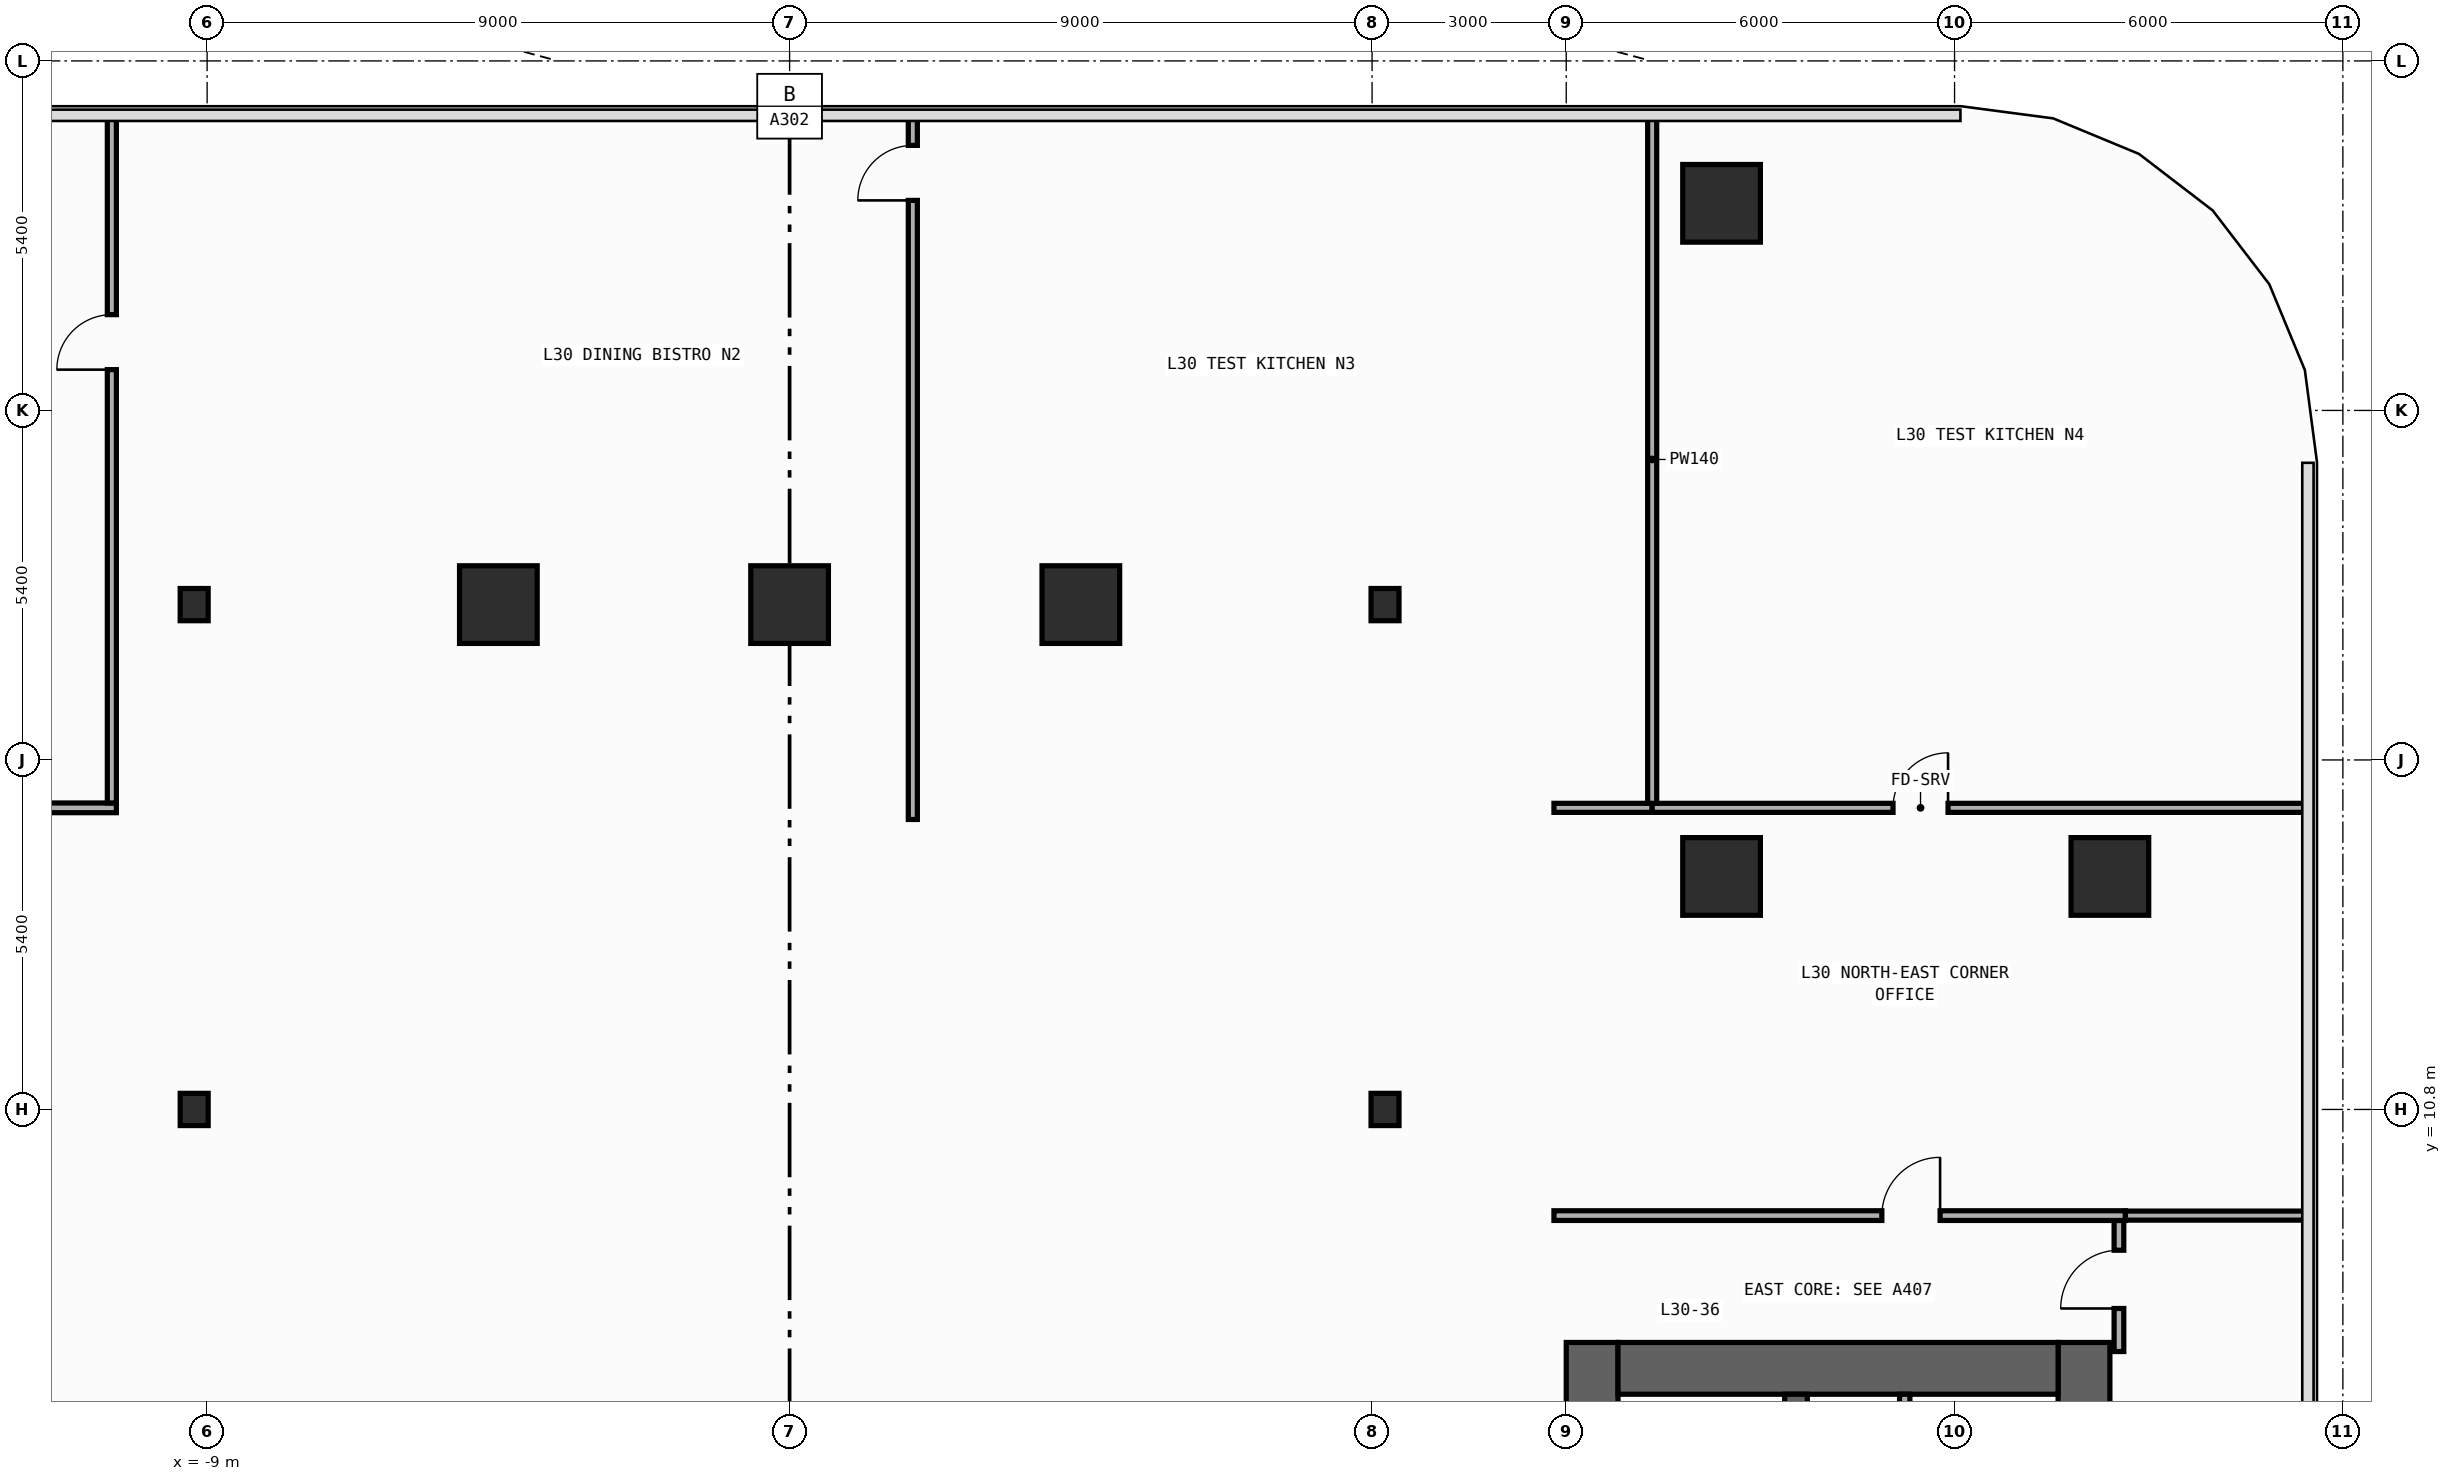
"""IFC4 building model, lengths in metres.
Left out: names, types, materials, properties, quantities, classifications, styles, units other than length and angle.
Written with IfcOpenShell. Run it as: python <this file> out.ifc"""

import sys

from ifc_helpers import new_model, si_unit, direction, frame, frame_2d, origin, origin_2d, place, context, subcontext, project, spatial, rectangle, i_section, extrude, element, fill, save


model = new_model("IFC4")
c1 = context("Model", 3, precision=1e-05, world=origin(), true_north=direction((0.0, 1.0)))
c2 = subcontext(c1, "Body", "Model", "MODEL_VIEW")
j1 = project(units=[si_unit("LENGTHUNIT", "METRE"), si_unit("PLANEANGLEUNIT", "RADIAN")], contexts=[c1])
p1 = place(None, origin())
s1 = spatial("IfcSite", under=j1, at=p1, CompositionType="ELEMENT")
p2 = place(p1, origin())
s2 = spatial("IfcBuilding", under=s1, at=p2, CompositionType="ELEMENT")
p3 = place(p2, frame((0.0, 0.0, 131.0)))
s3 = spatial("IfcBuildingStorey", under=s2, at=p3, CompositionType="ELEMENT", Elevation=131.0)
p4 = place(p3, frame((12.4, -19.8, 0.0), z_axis=(0.0, 0.0, 1.0), x_axis=(0.0, 1.0, 0.0)))
e1 = element("IfcWall", 1, at=p4, inside=s3, PredefinedType="SHEAR", context=c2, shape_type="SweptSolid", body=[
    extrude(rectangle(XDim=27.0, YDim=0.8, at=frame_2d((13.5, 0.0))), origin(), (0.0, 0.0, 1.0), 3.94),
])
p5 = place(p4, frame((23.05, 0.0, 0.0)))
e2 = element("IfcOpeningElement", 2, at=p5, cuts=e1, PredefinedType="OPENING", context=c2, shape_type="SweptSolid", body=[
    extrude(rectangle(XDim=1.1, YDim=2.2, at=frame_2d((0.55, 1.1))), frame((0.0, 0.41, 0.0), z_axis=(0.0, -1.0, 0.0), x_axis=(1.0, 0.0, 0.0)), (0.0, 0.0, 1.0), 0.82),
])
p6 = place(p4, frame((19.85, 0.0, 0.0)))
e3 = element("IfcOpeningElement", 3, at=p6, cuts=e1, PredefinedType="OPENING", context=c2, shape_type="SweptSolid", body=[
    extrude(rectangle(XDim=1.1, YDim=2.2, at=frame_2d((0.55, 1.1))), frame((0.0, 0.41, 0.0), z_axis=(0.0, -1.0, 0.0), x_axis=(1.0, 0.0, 0.0)), (0.0, 0.0, 1.0), 0.82),
])
p7 = place(p4, frame((16.65, 0.0, 0.0)))
e4 = element("IfcOpeningElement", 4, at=p7, cuts=e1, PredefinedType="OPENING", context=c2, shape_type="SweptSolid", body=[
    extrude(rectangle(XDim=1.1, YDim=2.2, at=frame_2d((0.55, 1.1))), frame((0.0, 0.41, 0.0), z_axis=(0.0, -1.0, 0.0), x_axis=(1.0, 0.0, 0.0)), (0.0, 0.0, 1.0), 0.82),
])
p8 = place(p4, frame((6.275, 0.0, 0.0)))
e5 = element("IfcOpeningElement", 5, at=p8, cuts=e1, PredefinedType="OPENING", context=c2, shape_type="SweptSolid", body=[
    extrude(rectangle(XDim=0.85, YDim=2.1, at=frame_2d((0.425, 1.05))), frame((0.0, 0.41, 0.0), z_axis=(0.0, -1.0, 0.0), x_axis=(1.0, 0.0, 0.0)), (0.0, 0.0, 1.0), 0.82),
])
p9 = place(p4, frame((8.575, 0.0, 0.0)))
e6 = element("IfcOpeningElement", 6, at=p9, cuts=e1, PredefinedType="OPENING", context=c2, shape_type="SweptSolid", body=[
    extrude(rectangle(XDim=0.85, YDim=2.1, at=frame_2d((0.425, 1.05))), frame((0.0, 0.41, 0.0), z_axis=(0.0, -1.0, 0.0), x_axis=(1.0, 0.0, 0.0)), (0.0, 0.0, 1.0), 0.82),
])
p10 = place(p4, frame((10.675, 0.0, 0.0)))
e7 = element("IfcOpeningElement", 7, at=p10, cuts=e1, PredefinedType="OPENING", context=c2, shape_type="SweptSolid", body=[
    extrude(rectangle(XDim=0.85, YDim=2.1, at=frame_2d((0.425, 1.05))), frame((0.0, 0.41, 0.0), z_axis=(0.0, -1.0, 0.0), x_axis=(1.0, 0.0, 0.0)), (0.0, 0.0, 1.0), 0.82),
])
p11 = place(p4, frame((12.725, 0.0, 0.0)))
e8 = element("IfcOpeningElement", 8, at=p11, cuts=e1, PredefinedType="OPENING", context=c2, shape_type="SweptSolid", body=[
    extrude(rectangle(XDim=1.15, YDim=2.2, at=frame_2d((0.575, 1.1))), frame((0.0, 0.41, 0.0), z_axis=(0.0, -1.0, 0.0), x_axis=(1.0, 0.0, 0.0)), (0.0, 0.0, 1.0), 0.82),
])
p12 = place(p4, frame((25.125, 0.0, 0.0)))
e9 = element("IfcOpeningElement", 9, at=p12, cuts=e1, PredefinedType="OPENING", context=c2, shape_type="SweptSolid", body=[
    extrude(rectangle(XDim=0.85, YDim=2.1, at=frame_2d((0.425, 1.05))), frame((0.0, 0.41, 0.0), z_axis=(0.0, -1.0, 0.0), x_axis=(1.0, 0.0, 0.0)), (0.0, 0.0, 1.0), 0.82),
])
p13 = place(p3, frame((20.0, -19.8, 0.0), z_axis=(0.0, 0.0, 1.0), x_axis=(0.0, 1.0, 0.0)))
e10 = element("IfcWall", 10, at=p13, inside=s3, PredefinedType="SHEAR", context=c2, shape_type="SweptSolid", body=[
    extrude(rectangle(XDim=27.0, YDim=0.8, at=frame_2d((13.5, 0.0))), origin(), (0.0, 0.0, 1.0), 3.94),
])
p14 = place(p3, frame((12.8, 6.8, 0.0), z_axis=(0.0, 0.0, 1.0), x_axis=(1.0, 0.0, 0.0)))
e11 = element("IfcWall", 11, at=p14, inside=s3, PredefinedType="SHEAR", context=c2, shape_type="SweptSolid", body=[
    extrude(rectangle(XDim=6.8, YDim=0.8, at=frame_2d((3.4, 0.0))), origin(), (0.0, 0.0, 1.0), 3.94),
])
p15 = place(p3, frame((15.55, -19.0, 0.0), z_axis=(0.0, 0.0, 1.0), x_axis=(0.0, 1.0, 0.0)))
e12 = element("IfcWall", 12, at=p15, inside=s3, PredefinedType="SHEAR", context=c2, shape_type="SweptSolid", body=[
    extrude(rectangle(XDim=25.4, YDim=0.35, at=frame_2d((12.7, 0.0))), origin(), (0.0, 0.0, 1.0), 3.94),
])
p16 = place(p15, frame((11.925, 0.0, 0.0)))
e13 = element("IfcOpeningElement", 13, at=p16, cuts=e12, PredefinedType="OPENING", context=c2, shape_type="SweptSolid", body=[
    extrude(rectangle(XDim=1.15, YDim=2.2, at=frame_2d((0.575, 1.1))), frame((0.0, 0.185, 0.0), z_axis=(0.0, -1.0, 0.0), x_axis=(1.0, 0.0, 0.0)), (0.0, 0.0, 1.0), 0.37),
])
p17 = place(p15, frame((24.325, 0.0, 0.0)))
e14 = element("IfcOpeningElement", 14, at=p17, cuts=e12, PredefinedType="OPENING", context=c2, shape_type="SweptSolid", body=[
    extrude(rectangle(XDim=0.85, YDim=2.1, at=frame_2d((0.425, 1.05))), frame((0.0, 0.185, 0.0), z_axis=(0.0, -1.0, 0.0), x_axis=(1.0, 0.0, 0.0)), (0.0, 0.0, 1.0), 0.37),
])
for number, where, z_axis, x_axis in (
    (15, (-9.2, 10.8, 0.0), (0.0, 0.0, 1.0), (1.0, 0.0, 0.0)),
    (16, (-9.2, 18.6, 0.0), (0.0, 0.0, 1.0), (1.0, 0.0, 0.0)),
    (17, (9.2, 10.8, 0.0), (0.0, 0.0, 1.0), (1.0, 0.0, 0.0)),
    (18, (9.2, 18.6, 0.0), (0.0, 0.0, 1.0), (1.0, 0.0, 0.0)),
):
    element("IfcColumn", number, at=place(p3, frame(where, z_axis=z_axis, x_axis=x_axis)), inside=s3, PredefinedType="COLUMN", context=c2, shape_type="SweptSolid", body=[
        extrude(i_section(OverallWidth=0.432, OverallDepth=0.498, WebThickness=0.045, FlangeThickness=0.07, FilletRadius=0.022, at=origin_2d()), origin(), (0.0, 0.0, 1.0), 4.2),
    ])
for number, where, z_axis, x_axis in (
    (19, (20.4, 14.4, 0.0), (0.0, 0.0, 1.0), (1.0, 0.0, 0.0)),
    (20, (14.4, 14.4, 0.0), (0.0, 0.0, 1.0), (1.0, 0.0, 0.0)),
    (21, (-4.5, 18.6, 0.0), (0.0, 0.0, 1.0), (1.0, 0.0, 0.0)),
    (22, (0.0, 18.6, 0.0), (0.0, 0.0, 1.0), (1.0, 0.0, 0.0)),
    (23, (4.5, 18.6, 0.0), (0.0, 0.0, 1.0), (1.0, 0.0, 0.0)),
    (24, (14.4, 24.8, 0.0), (0.0, 0.0, 1.0), (1.0, 0.0, 0.0)),
):
    element("IfcColumn", number, at=place(p3, frame(where, z_axis=z_axis, x_axis=x_axis)), inside=s3, PredefinedType="COLUMN", context=c2, shape_type="SweptSolid", body=[
        extrude(rectangle(XDim=1.2, YDim=1.2, at=origin_2d()), origin(), (0.0, 0.0, 1.0), 4.2),
    ])
p18 = place(p3, frame((17.23, 4.17, 0.0), z_axis=(0.0, 0.0, 1.0), x_axis=(0.0, 1.0, 0.0)))
e25 = element("IfcWall", 25, at=p18, inside=s3, PredefinedType="PARTITIONING", context=c2, shape_type="SweptSolid", body=[
    extrude(rectangle(XDim=2.23, YDim=0.16, at=frame_2d((1.115, 0.0))), origin(), (0.0, 0.0, 1.0), 3.94),
])
p19 = place(p18, frame((0.46, 0.0, 0.0)))
e26 = element("IfcOpeningElement", 26, at=p19, cuts=e25, PredefinedType="OPENING", context=c2, shape_type="SweptSolid", body=[
    extrude(rectangle(XDim=0.85, YDim=2.1, at=frame_2d((0.425, 1.05))), frame((0.0, 0.09, 0.0), z_axis=(0.0, -1.0, 0.0), x_axis=(1.0, 0.0, 0.0)), (0.0, 0.0, 1.0), 0.18),
])
p20 = place(p3, frame((-11.99, 15.46, 0.0), z_axis=(0.0, 0.0, 1.0), x_axis=(1.0, 0.0, 0.0)))
e27 = element("IfcWall", 27, at=p20, inside=s3, PredefinedType="PARTITIONING", context=c2, shape_type="SweptSolid", body=[
    extrude(rectangle(XDim=1.588, YDim=0.15, at=frame_2d((0.794, 0.0))), origin(), (0.0, 0.0, 1.0), 3.94),
])
p21 = place(p3, frame((20.54, 7.06, 0.0), z_axis=(0.0, 0.0, 1.0), x_axis=(0.0, 1.0, 0.0)))
e28 = element("IfcWall", 28, at=p21, inside=s3, PredefinedType="PARTITIONING", context=c2, shape_type="SweptSolid", body=[
    extrude(rectangle(XDim=2.025, YDim=0.15, at=frame_2d((1.012, 0.0))), origin(), (0.0, 0.0, 1.0), 3.94),
])
p22 = place(p21, frame((0.665, 0.0, 0.0)))
e29 = element("IfcOpeningElement", 29, at=p22, cuts=e28, PredefinedType="OPENING", context=c2, shape_type="SweptSolid", body=[
    extrude(rectangle(XDim=0.9, YDim=2.15, at=frame_2d((0.45, 1.075))), frame((0.0, 0.085, 0.0), z_axis=(0.0, -1.0, 0.0), x_axis=(1.0, 0.0, 0.0)), (0.0, 0.0, 1.0), 0.17),
])
p23 = place(p3, frame((11.81, 9.16, 0.0), z_axis=(0.0, 0.0, 1.0), x_axis=(1.0, 0.0, 0.0)))
e30 = element("IfcWall", 30, at=p23, inside=s3, PredefinedType="PARTITIONING", context=c2, shape_type="SweptSolid", body=[
    extrude(rectangle(XDim=8.83, YDim=0.15, at=frame_2d((4.415, 0.0))), origin(), (0.0, 0.0, 1.0), 3.94),
])
p24 = place(p23, frame((5.067, 0.0, 0.0)))
e31 = element("IfcOpeningElement", 31, at=p24, cuts=e30, PredefinedType="OPENING", context=c2, shape_type="SweptSolid", body=[
    extrude(rectangle(XDim=0.9, YDim=2.15, at=frame_2d((0.45, 1.075))), frame((0.0, 0.085, 0.0), z_axis=(0.0, -1.0, 0.0), x_axis=(1.0, 0.0, 0.0)), (0.0, 0.0, 1.0), 0.17),
])
p25 = place(p3, frame((20.64, 9.16, 0.0), z_axis=(0.0, 0.0, 1.0), x_axis=(1.0, 0.0, 0.0)))
e32 = element("IfcWall", 32, at=p25, inside=s3, PredefinedType="PARTITIONING", context=c2, shape_type="SweptSolid", body=[
    extrude(rectangle(XDim=2.815, YDim=0.14, at=frame_2d((1.408, 0.0))), origin(), (0.0, 0.0, 1.0), 3.94),
])
p26 = place(p3, frame((11.81, 15.46, 0.0), z_axis=(0.0, 0.0, 1.0), x_axis=(1.0, 0.0, 0.0)))
e33 = element("IfcWall", 33, at=p26, inside=s3, PredefinedType="PARTITIONING", context=c2, shape_type="SweptSolid", body=[
    extrude(rectangle(XDim=1.518, YDim=0.14, at=frame_2d((0.759, 0.0))), origin(), (0.0, 0.0, 1.0), 3.94),
])
p27 = place(p3, frame((13.328, 15.46, 0.0), z_axis=(0.0, 0.0, 1.0), x_axis=(1.0, 0.0, 0.0)))
e34 = element("IfcWall", 34, at=p27, inside=s3, PredefinedType="PARTITIONING", context=c2, shape_type="SweptSolid", body=[
    extrude(rectangle(XDim=10.127, YDim=0.14, at=frame_2d((5.063, 0.0))), origin(), (0.0, 0.0, 1.0), 3.94),
])
p28 = place(p27, frame((3.721, 0.0, 0.0)))
e35 = element("IfcOpeningElement", 35, at=p28, cuts=e34, PredefinedType="OPENING", context=c2, shape_type="SweptSolid", body=[
    extrude(rectangle(XDim=0.85, YDim=2.1, at=frame_2d((0.425, 1.05))), frame((0.0, 0.08, 0.0), z_axis=(0.0, -1.0, 0.0), x_axis=(1.0, 0.0, 0.0)), (0.0, 0.0, 1.0), 0.16),
])
p29 = place(p3, frame((-10.472, 15.535, 0.0), z_axis=(0.0, 0.0, 1.0), x_axis=(0.0, 1.0, 0.0)))
e36 = element("IfcWall", 36, at=p29, inside=s3, PredefinedType="PARTITIONING", context=c2, shape_type="SweptSolid", body=[
    extrude(rectangle(XDim=10.62, YDim=0.14, at=frame_2d((5.31, 0.0))), origin(), (0.0, 0.0, 1.0), 3.94),
])
p30 = place(p29, frame((6.695, 0.0, 0.0)))
e37 = element("IfcOpeningElement", 37, at=p30, cuts=e36, PredefinedType="OPENING", context=c2, shape_type="SweptSolid", body=[
    extrude(rectangle(XDim=0.85, YDim=2.1, at=frame_2d((0.425, 1.05))), frame((0.0, 0.08, 0.0), z_axis=(0.0, -1.0, 0.0), x_axis=(1.0, 0.0, 0.0)), (0.0, 0.0, 1.0), 0.16),
])
p31 = place(p3, frame((1.904, 15.28, 0.0), z_axis=(0.0, 0.0, 1.0), x_axis=(0.0, 1.0, 0.0)))
e38 = element("IfcWall", 38, at=p31, inside=s3, PredefinedType="PARTITIONING", context=c2, shape_type="SweptSolid", body=[
    extrude(rectangle(XDim=10.875, YDim=0.14, at=frame_2d((5.438, 0.0))), origin(), (0.0, 0.0, 1.0), 3.94),
])
p32 = place(p31, frame((9.565, 0.0, 0.0)))
e39 = element("IfcOpeningElement", 39, at=p32, cuts=e38, PredefinedType="OPENING", context=c2, shape_type="SweptSolid", body=[
    extrude(rectangle(XDim=0.85, YDim=2.1, at=frame_2d((0.425, 1.05))), frame((0.0, 0.08, 0.0), z_axis=(0.0, -1.0, 0.0), x_axis=(1.0, 0.0, 0.0)), (0.0, 0.0, 1.0), 0.16),
])
p33 = place(p3, frame((13.328, 15.53, 0.0), z_axis=(0.0, 0.0, 1.0), x_axis=(0.0, 1.0, 0.0)))
e40 = element("IfcWall", 40, at=p33, inside=s3, PredefinedType="PARTITIONING", context=c2, shape_type="SweptSolid", body=[
    extrude(rectangle(XDim=10.625, YDim=0.14, at=frame_2d((5.312, 0.0))), origin(), (0.0, 0.0, 1.0), 3.94),
])
p34 = place(p22, origin())
e41 = element("IfcDoor", 41, at=p34, inside=s3, OperationType="SINGLE_SWING_LEFT", PredefinedType="DOOR", context=c2, shape_type="SweptSolid", body=[
    extrude(rectangle(XDim=0.9, YDim=2.15, at=frame_2d((0.45, 1.075))), frame((0.0, 0.025, 0.0), z_axis=(0.0, -1.0, 0.0), x_axis=(1.0, 0.0, 0.0)), (0.0, 0.0, 1.0), 0.05),
])
fill(e29, e41)
p35 = place(p24, origin())
e42 = element("IfcDoor", 42, at=p35, inside=s3, OperationType="SINGLE_SWING_RIGHT", PredefinedType="DOOR", context=c2, shape_type="SweptSolid", body=[
    extrude(rectangle(XDim=0.9, YDim=2.15, at=frame_2d((0.45, 1.075))), frame((0.0, 0.025, 0.0), z_axis=(0.0, -1.0, 0.0), x_axis=(1.0, 0.0, 0.0)), (0.0, 0.0, 1.0), 0.05),
])
fill(e31, e42)
p36 = place(p30, origin())
e43 = element("IfcDoor", 43, at=p36, inside=s3, OperationType="SINGLE_SWING_LEFT", PredefinedType="DOOR", context=c2, shape_type="SweptSolid", body=[
    extrude(rectangle(XDim=0.85, YDim=2.1, at=frame_2d((0.425, 1.05))), frame((0.0, 0.025, 0.0), z_axis=(0.0, -1.0, 0.0), x_axis=(1.0, 0.0, 0.0)), (0.0, 0.0, 1.0), 0.05),
])
fill(e37, e43)
p37 = place(p28, origin())
e44 = element("IfcDoor", 44, at=p37, inside=s3, OperationType="SINGLE_SWING_RIGHT", PredefinedType="DOOR", context=c2, shape_type="SweptSolid", body=[
    extrude(rectangle(XDim=0.85, YDim=2.1, at=frame_2d((0.425, 1.05))), frame((0.0, 0.025, 0.0), z_axis=(0.0, -1.0, 0.0), x_axis=(1.0, 0.0, 0.0)), (0.0, 0.0, 1.0), 0.05),
])
fill(e35, e44)
p38 = place(p32, origin())
e45 = element("IfcDoor", 45, at=p38, inside=s3, OperationType="SINGLE_SWING_LEFT", PredefinedType="DOOR", context=c2, shape_type="SweptSolid", body=[
    extrude(rectangle(XDim=0.85, YDim=2.1, at=frame_2d((0.425, 1.05))), frame((0.0, 0.025, 0.0), z_axis=(0.0, -1.0, 0.0), x_axis=(1.0, 0.0, 0.0)), (0.0, 0.0, 1.0), 0.05),
])
fill(e39, e45)
save(model, sys.argv[1])
